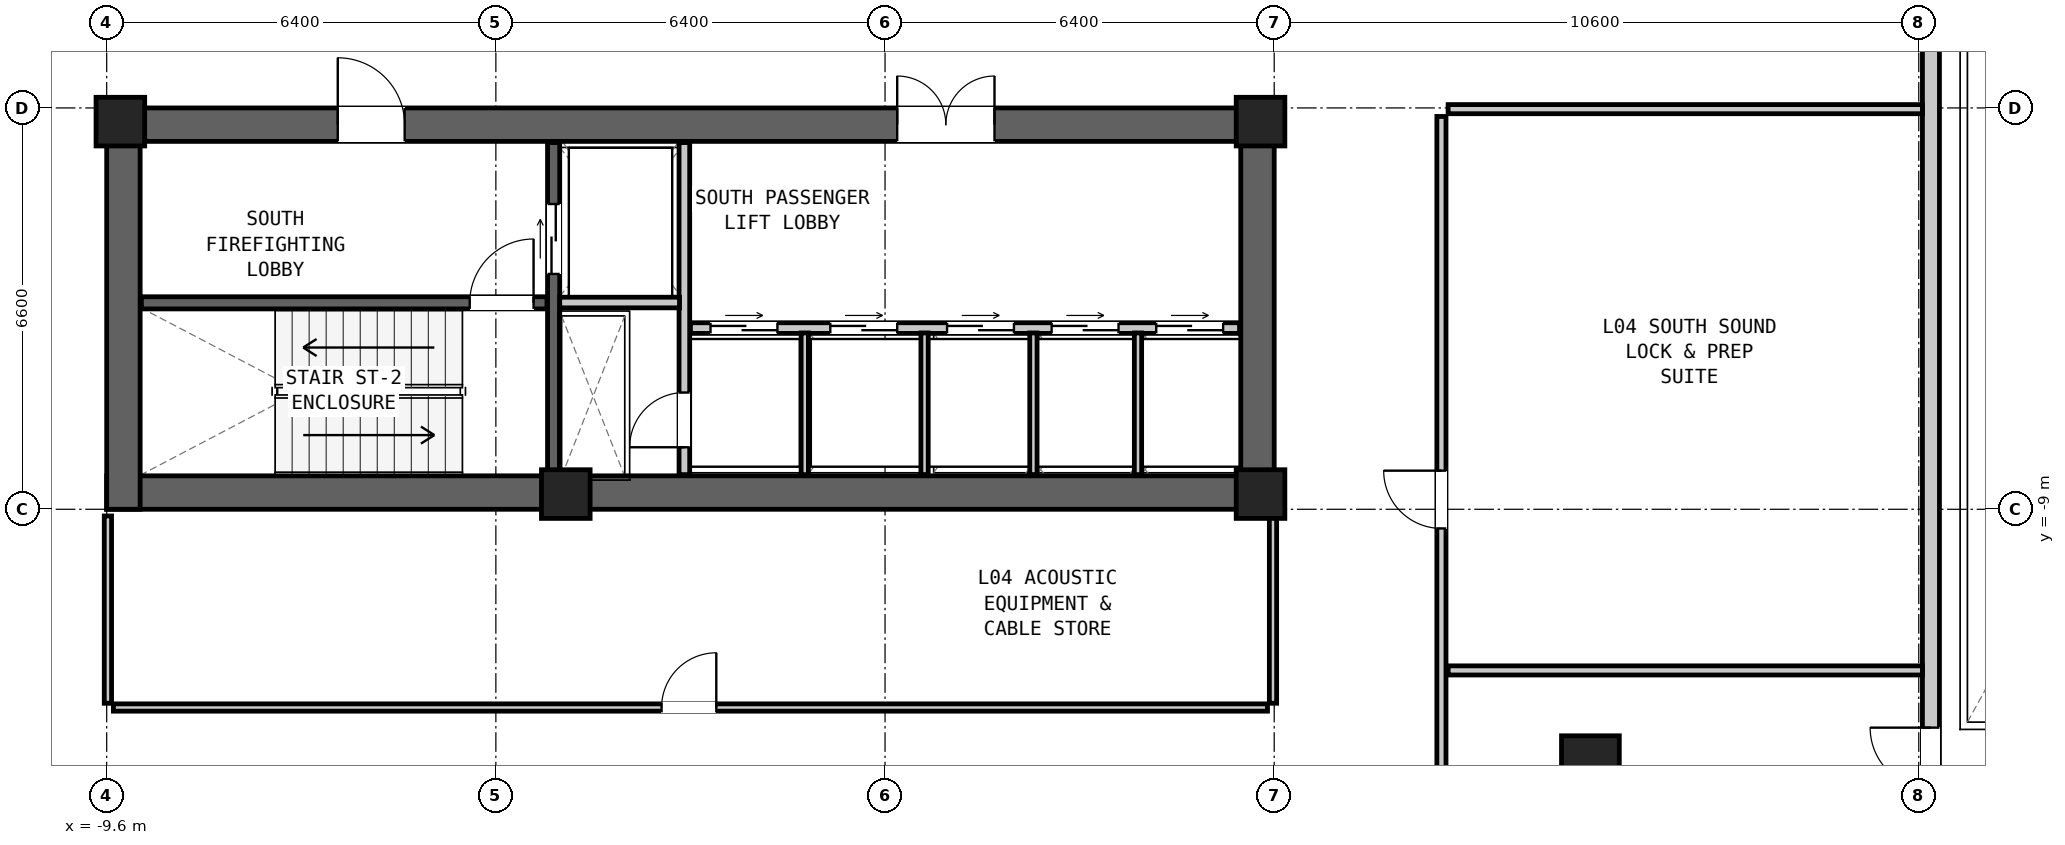
"""IFC4 building model, lengths in metres.
Left out: names, types, materials, properties, quantities, classifications, styles, units other than length and angle.
Written with IfcOpenShell. Run it as: python <this file> out.ifc"""

import sys

from ifc_helpers import new_model, si_unit, direction, frame, frame_2d, origin, origin_2d, place, context, subcontext, project, spatial, rectangle, hollow_rectangle, extrude, element, fill, save


model = new_model("IFC4")
c1 = context("Model", 3, precision=1e-05, world=origin(), true_north=direction((0.0, 1.0)))
c2 = subcontext(c1, "Body", "Model", "MODEL_VIEW")
j1 = project(units=[si_unit("LENGTHUNIT", "METRE"), si_unit("PLANEANGLEUNIT", "RADIAN")], contexts=[c1])
p1 = place(None, origin())
s1 = spatial("IfcSite", under=j1, at=p1, CompositionType="ELEMENT")
p2 = place(p1, origin())
s2 = spatial("IfcBuilding", under=s1, at=p2, CompositionType="ELEMENT")
p3 = place(p2, frame((0.0, 0.0, 17.7)))
s3 = spatial("IfcBuildingStorey", under=s2, at=p3, CompositionType="ELEMENT", Elevation=17.7)
p4 = place(p3, frame((-9.6, -8.725, 0.0), z_axis=(0.0, 0.0, 1.0), x_axis=(1.0, 0.0, 0.0)))
e1 = element("IfcWall", 1, at=p4, inside=s3, PredefinedType="SHEAR", context=c2, shape_type="SweptSolid", body=[
    extrude(rectangle(XDim=19.2, YDim=0.55, at=frame_2d((9.6, 0.0))), origin(), (0.0, 0.0, 1.0), 4.2),
])
p5 = place(p3, frame((-9.6, -2.675, 0.0), z_axis=(0.0, 0.0, 1.0), x_axis=(1.0, 0.0, 0.0)))
e2 = element("IfcWall", 2, at=p5, inside=s3, PredefinedType="SHEAR", context=c2, shape_type="SweptSolid", body=[
    extrude(rectangle(XDim=19.2, YDim=0.55, at=frame_2d((9.6, 0.0))), origin(), (0.0, 0.0, 1.0), 4.2),
])
p6 = place(p5, frame((3.8, 0.0, 0.0)))
e3 = element("IfcOpeningElement", 3, at=p6, cuts=e2, PredefinedType="OPENING", context=c2, shape_type="SweptSolid", body=[
    extrude(rectangle(XDim=1.1, YDim=2.08, at=frame_2d((0.55, 1.04))), frame((0.0, 0.287, 0.0), z_axis=(0.0, -1.0, 0.0), x_axis=(1.0, 0.0, 0.0)), (0.0, 0.0, 1.0), 0.574),
])
p7 = place(p5, frame((13.0, 0.0, 0.0)))
e4 = element("IfcOpeningElement", 4, at=p7, cuts=e2, PredefinedType="OPENING", context=c2, shape_type="SweptSolid", body=[
    extrude(rectangle(XDim=1.6, YDim=2.12, at=frame_2d((0.8, 1.06))), frame((0.0, 0.287, 0.0), z_axis=(0.0, -1.0, 0.0), x_axis=(1.0, 0.0, 0.0)), (0.0, 0.0, 1.0), 0.574),
])
for number, where, z_axis, x_axis in (
    (5, (-9.325, -9.0, 0.0), (0.0, 0.0, 1.0), (0.0, 1.0, 0.0)),
    (6, (9.325, -9.0, 0.0), (0.0, 0.0, 1.0), (0.0, 1.0, 0.0)),
):
    element("IfcWall", number, at=place(p3, frame(where, z_axis=z_axis, x_axis=x_axis)), inside=s3, PredefinedType="SHEAR", context=c2, shape_type="SweptSolid", body=[
        extrude(rectangle(XDim=6.6, YDim=0.55, at=frame_2d((3.3, 0.0))), origin(), (0.0, 0.0, 1.0), 4.2),
    ])
p8 = place(p3, frame((14.8, -13.2, 0.0), z_axis=(0.0, 0.0, 1.0), x_axis=(1.0, 0.0, 0.0)))
e7 = element("IfcColumn", 7, at=p8, inside=s3, PredefinedType="COLUMN", context=c2, shape_type="SweptSolid", body=[
    extrude(hollow_rectangle(XDim=0.95, YDim=0.95, WallThickness=0.06, at=origin_2d()), origin(), (0.0, 0.0, 1.0), 4.2),
])
for number, where, z_axis, x_axis in (
    (8, (-9.375, -2.625, 0.0), (0.0, 0.0, 1.0), (1.0, 0.0, 0.0)),
    (9, (9.375, -2.625, 0.0), (0.0, 0.0, 1.0), (1.0, 0.0, 0.0)),
    (10, (-2.05, -8.75, 0.0), (0.0, 0.0, 1.0), (1.0, 0.0, 0.0)),
    (11, (9.375, -8.75, 0.0), (0.0, 0.0, 1.0), (1.0, 0.0, 0.0)),
):
    element("IfcColumn", number, at=place(p3, frame(where, z_axis=z_axis, x_axis=x_axis)), inside=s3, PredefinedType="COLUMN", context=c2, shape_type="SweptSolid", body=[
        extrude(rectangle(XDim=0.8, YDim=0.8, at=origin_2d()), origin(), (0.0, 0.0, 1.0), 4.2),
    ])
p9 = place(p3, frame((-9.03, -5.605, 0.0), z_axis=(0.0, 0.0, 1.0), x_axis=(1.0, 0.0, 0.0)))
e12 = element("IfcWall", 12, at=p9, inside=s3, PredefinedType="SHEAR", context=c2, shape_type="SweptSolid", body=[
    extrude(rectangle(XDim=6.67, YDim=0.2, at=frame_2d((3.335, 0.0))), origin(), (0.0, 0.0, 1.0), 3.82),
])
p10 = place(p9, frame((5.4, 0.0, 0.0)))
e13 = element("IfcOpeningElement", 13, at=p10, cuts=e12, PredefinedType="OPENING", context=c2, shape_type="SweptSolid", body=[
    extrude(rectangle(XDim=1.05, YDim=2.08, at=frame_2d((0.525, 1.04))), frame((0.0, 0.112, 0.0), z_axis=(0.0, -1.0, 0.0), x_axis=(1.0, 0.0, 0.0)), (0.0, 0.0, 1.0), 0.224),
])
p11 = place(p3, frame((-2.25, -8.43, 0.0), z_axis=(0.0, 0.0, 1.0), x_axis=(0.0, 1.0, 0.0)))
e14 = element("IfcWall", 14, at=p11, inside=s3, PredefinedType="SHEAR", context=c2, shape_type="SweptSolid", body=[
    extrude(rectangle(XDim=5.46, YDim=0.2, at=frame_2d((2.73, 0.0))), origin(), (0.0, 0.0, 1.0), 3.82),
])
p12 = place(p11, frame((3.3, 0.0, 0.0)))
e15 = element("IfcOpeningElement", 15, at=p12, cuts=e14, PredefinedType="OPENING", context=c2, shape_type="SweptSolid", body=[
    extrude(rectangle(XDim=1.15, YDim=2.08, at=frame_2d((0.575, 1.04))), frame((0.0, 0.112, 0.0), z_axis=(0.0, -1.0, 0.0), x_axis=(1.0, 0.0, 0.0)), (0.0, 0.0, 1.0), 0.224),
])
p13 = place(p3, frame((-0.1, -8.43, 0.0), z_axis=(0.0, 0.0, 1.0), x_axis=(0.0, 1.0, 0.0)))
e16 = element("IfcWall", 16, at=p13, inside=s3, PredefinedType="PARTITIONING", context=c2, shape_type="SweptSolid", body=[
    extrude(rectangle(XDim=5.46, YDim=0.175, at=frame_2d((2.73, 0.0))), origin(), (0.0, 0.0, 1.0), 3.82),
])
p14 = place(p13, frame((0.45, 0.0, 0.0)))
e17 = element("IfcOpeningElement", 17, at=p14, cuts=e16, PredefinedType="OPENING", context=c2, shape_type="SweptSolid", body=[
    extrude(rectangle(XDim=0.9, YDim=2.05, at=frame_2d((0.45, 1.025))), frame((0.0, 0.1, 0.0), z_axis=(0.0, -1.0, 0.0), x_axis=(1.0, 0.0, 0.0)), (0.0, 0.0, 1.0), 0.199),
])
p15 = place(p3, frame((-2.15, -5.6, 0.0), z_axis=(0.0, 0.0, 1.0), x_axis=(1.0, 0.0, 0.0)))
e18 = element("IfcWall", 18, at=p15, inside=s3, PredefinedType="PARTITIONING", context=c2, shape_type="SweptSolid", body=[
    extrude(rectangle(XDim=1.97, YDim=0.175, at=frame_2d((0.985, 0.0))), origin(), (0.0, 0.0, 1.0), 3.82),
])
p16 = place(p3, frame((0.0, -6.02, 0.0), z_axis=(0.0, 0.0, 1.0), x_axis=(1.0, 0.0, 0.0)))
e19 = element("IfcWall", 19, at=p16, inside=s3, PredefinedType="PARTITIONING", context=c2, shape_type="SweptSolid", body=[
    extrude(rectangle(XDim=9.03, YDim=0.175, at=frame_2d((4.515, 0.0))), origin(), (0.0, 0.0, 1.0), 3.82),
])
p17 = place(p16, frame((0.33, 0.0, 0.0)))
e20 = element("IfcOpeningElement", 20, at=p17, cuts=e19, PredefinedType="OPENING", context=c2, shape_type="SweptSolid", body=[
    extrude(rectangle(XDim=1.1, YDim=2.06, at=frame_2d((0.55, 1.03))), frame((0.0, 0.1, 0.0), z_axis=(0.0, -1.0, 0.0), x_axis=(1.0, 0.0, 0.0)), (0.0, 0.0, 1.0), 0.199),
])
p18 = place(p16, frame((2.3, 0.0, 0.0)))
e21 = element("IfcOpeningElement", 21, at=p18, cuts=e19, PredefinedType="OPENING", context=c2, shape_type="SweptSolid", body=[
    extrude(rectangle(XDim=1.1, YDim=2.06, at=frame_2d((0.55, 1.03))), frame((0.0, 0.1, 0.0), z_axis=(0.0, -1.0, 0.0), x_axis=(1.0, 0.0, 0.0)), (0.0, 0.0, 1.0), 0.199),
])
p19 = place(p16, frame((4.22, 0.0, 0.0)))
e22 = element("IfcOpeningElement", 22, at=p19, cuts=e19, PredefinedType="OPENING", context=c2, shape_type="SweptSolid", body=[
    extrude(rectangle(XDim=1.1, YDim=2.06, at=frame_2d((0.55, 1.03))), frame((0.0, 0.1, 0.0), z_axis=(0.0, -1.0, 0.0), x_axis=(1.0, 0.0, 0.0)), (0.0, 0.0, 1.0), 0.199),
])
p20 = place(p16, frame((5.94, 0.0, 0.0)))
e23 = element("IfcOpeningElement", 23, at=p20, cuts=e19, PredefinedType="OPENING", context=c2, shape_type="SweptSolid", body=[
    extrude(rectangle(XDim=1.1, YDim=2.06, at=frame_2d((0.55, 1.03))), frame((0.0, 0.1, 0.0), z_axis=(0.0, -1.0, 0.0), x_axis=(1.0, 0.0, 0.0)), (0.0, 0.0, 1.0), 0.199),
])
p21 = place(p16, frame((7.66, 0.0, 0.0)))
e24 = element("IfcOpeningElement", 24, at=p21, cuts=e19, PredefinedType="OPENING", context=c2, shape_type="SweptSolid", body=[
    extrude(rectangle(XDim=1.1, YDim=2.06, at=frame_2d((0.55, 1.03))), frame((0.0, 0.1, 0.0), z_axis=(0.0, -1.0, 0.0), x_axis=(1.0, 0.0, 0.0)), (0.0, 0.0, 1.0), 0.199),
])
for number, where, z_axis, x_axis in (
    (25, (1.88, -8.43, 0.0), (0.0, 0.0, 1.0), (0.0, 1.0, 0.0)),
    (26, (3.85, -8.43, 0.0), (0.0, 0.0, 1.0), (0.0, 1.0, 0.0)),
    (27, (5.64, -8.43, 0.0), (0.0, 0.0, 1.0), (0.0, 1.0, 0.0)),
    (28, (7.36, -8.43, 0.0), (0.0, 0.0, 1.0), (0.0, 1.0, 0.0)),
):
    element("IfcWall", number, at=place(p3, frame(where, z_axis=z_axis, x_axis=x_axis)), inside=s3, PredefinedType="PARTITIONING", context=c2, shape_type="SweptSolid", body=[
        extrude(rectangle(XDim=2.33, YDim=0.12, at=frame_2d((1.165, 0.0))), origin(), (0.0, 0.0, 1.0), 3.82),
    ])
p22 = place(p3, frame((20.4, -25.74, 0.0), z_axis=(0.0, 0.0, 1.0), x_axis=(0.0, 1.0, 0.0)))
e29 = element("IfcWall", 29, at=p22, inside=s3, PredefinedType="MOVABLE", context=c2, shape_type="SweptSolid", body=[
    extrude(rectangle(XDim=51.48, YDim=0.28, at=frame_2d((25.74, 0.0))), origin(), (0.0, 0.0, 1.0), 3.193),
])
p23 = place(p22, frame((11.149, 0.0, 0.0)))
e30 = element("IfcOpeningElement", 30, at=p23, cuts=e29, PredefinedType="OPENING", context=c2, shape_type="SweptSolid", body=[
    extrude(rectangle(XDim=2.0, YDim=2.14, at=frame_2d((1.0, 1.07))), frame((0.0, 0.152, 0.0), z_axis=(0.0, -1.0, 0.0), x_axis=(1.0, 0.0, 0.0)), (0.0, 0.0, 1.0), 0.304),
])
p24 = place(p22, frame((38.64, 0.0, 0.0)))
e31 = element("IfcOpeningElement", 31, at=p24, cuts=e29, PredefinedType="OPENING", context=c2, shape_type="SweptSolid", body=[
    extrude(rectangle(XDim=2.0, YDim=2.14, at=frame_2d((1.0, 1.07))), frame((0.0, 0.152, 0.0), z_axis=(0.0, -1.0, 0.0), x_axis=(1.0, 0.0, 0.0)), (0.0, 0.0, 1.0), 0.304),
])
p25 = place(p3, frame((12.35, -15.14, 0.0), z_axis=(0.0, 0.0, 1.0), x_axis=(0.0, 1.0, 0.0)))
e32 = element("IfcWall", 32, at=p25, inside=s3, PredefinedType="PARTITIONING", context=c2, shape_type="SweptSolid", body=[
    extrude(rectangle(XDim=12.6, YDim=0.15, at=frame_2d((6.3, 0.0))), origin(), (0.0, 0.0, 1.0), 3.82),
])
p26 = place(p25, frame((5.825, 0.0, 0.0)))
e33 = element("IfcOpeningElement", 33, at=p26, cuts=e32, PredefinedType="OPENING", context=c2, shape_type="SweptSolid", body=[
    extrude(rectangle(XDim=0.95, YDim=2.1, at=frame_2d((0.475, 1.05))), frame((0.0, 0.087, 0.0), z_axis=(0.0, -1.0, 0.0), x_axis=(1.0, 0.0, 0.0)), (0.0, 0.0, 1.0), 0.174),
])
p27 = place(p3, frame((12.46, -2.42, 0.0), z_axis=(0.0, 0.0, 1.0), x_axis=(1.0, 0.0, 0.0)))
e34 = element("IfcWall", 34, at=p27, inside=s3, PredefinedType="PARTITIONING", context=c2, shape_type="SweptSolid", body=[
    extrude(rectangle(XDim=7.8, YDim=0.15, at=frame_2d((3.9, 0.0))), origin(), (0.0, 0.0, 1.0), 2.682),
])
p28 = place(p3, frame((-9.49, -12.26, 0.0), z_axis=(0.0, 0.0, 1.0), x_axis=(1.0, 0.0, 0.0)))
e35 = element("IfcWall", 35, at=p28, inside=s3, PredefinedType="PARTITIONING", context=c2, shape_type="SweptSolid", body=[
    extrude(rectangle(XDim=18.98, YDim=0.12, at=frame_2d((9.49, 0.0))), origin(), (0.0, 0.0, 1.0), 3.82),
])
p29 = place(p28, frame((9.015, 0.0, 0.0)))
e36 = element("IfcOpeningElement", 36, at=p29, cuts=e35, PredefinedType="OPENING", context=c2, shape_type="SweptSolid", body=[
    extrude(rectangle(XDim=0.9, YDim=2.05, at=frame_2d((0.45, 1.025))), frame((0.0, 0.072, 0.0), z_axis=(0.0, -1.0, 0.0), x_axis=(1.0, 0.0, 0.0)), (0.0, 0.0, 1.0), 0.144),
])
for number, where, z_axis, x_axis in (
    (37, (-9.58, -12.19, 0.0), (0.0, 0.0, 1.0), (0.0, 1.0, 0.0)),
    (38, (9.58, -12.19, 0.0), (0.0, 0.0, 1.0), (0.0, 1.0, 0.0)),
):
    element("IfcWall", number, at=place(p3, frame(where, z_axis=z_axis, x_axis=x_axis)), inside=s3, PredefinedType="PARTITIONING", context=c2, shape_type="SweptSolid", body=[
        extrude(rectangle(XDim=3.08, YDim=0.12, at=frame_2d((1.54, 0.0))), origin(), (0.0, 0.0, 1.0), 3.82),
    ])
p30 = place(p3, frame((12.46, -11.65, 0.0), z_axis=(0.0, 0.0, 1.0), x_axis=(1.0, 0.0, 0.0)))
e39 = element("IfcWall", 39, at=p30, inside=s3, PredefinedType="PARTITIONING", context=c2, shape_type="SweptSolid", body=[
    extrude(rectangle(XDim=7.8, YDim=0.15, at=frame_2d((3.9, 0.0))), origin(), (0.0, 0.0, 1.0), 3.82),
])
p31 = place(p10, origin())
e40 = element("IfcDoor", 40, at=p31, inside=s3, OperationType="SINGLE_SWING_RIGHT", PredefinedType="DOOR", context=c2, shape_type="SweptSolid", body=[
    extrude(rectangle(XDim=1.05, YDim=2.08, at=frame_2d((0.525, 1.04))), frame((0.0, 0.025, 0.0), z_axis=(0.0, -1.0, 0.0), x_axis=(1.0, 0.0, 0.0)), (0.0, 0.0, 1.0), 0.05),
])
fill(e13, e40)
p32 = place(p6, origin())
e41 = element("IfcDoor", 41, at=p32, inside=s3, OperationType="SINGLE_SWING_LEFT", PredefinedType="DOOR", context=c2, shape_type="SweptSolid", body=[
    extrude(rectangle(XDim=1.1, YDim=2.08, at=frame_2d((0.55, 1.04))), frame((0.0, 0.025, 0.0), z_axis=(0.0, -1.0, 0.0), x_axis=(1.0, 0.0, 0.0)), (0.0, 0.0, 1.0), 0.05),
])
fill(e3, e41)
p33 = place(p12, origin())
e42 = element("IfcDoor", 42, at=p33, inside=s3, OperationType="DOUBLE_DOOR_SLIDING", PredefinedType="DOOR", context=c2, shape_type="SweptSolid", body=[
    extrude(rectangle(XDim=1.15, YDim=2.08, at=frame_2d((0.575, 1.04))), frame((0.0, 0.025, 0.0), z_axis=(0.0, -1.0, 0.0), x_axis=(1.0, 0.0, 0.0)), (0.0, 0.0, 1.0), 0.05),
])
fill(e15, e42)
p34 = place(p14, origin())
e43 = element("IfcDoor", 43, at=p34, inside=s3, OperationType="SINGLE_SWING_LEFT", PredefinedType="DOOR", context=c2, shape_type="SweptSolid", body=[
    extrude(rectangle(XDim=0.9, YDim=2.05, at=frame_2d((0.45, 1.025))), frame((0.0, 0.025, 0.0), z_axis=(0.0, -1.0, 0.0), x_axis=(1.0, 0.0, 0.0)), (0.0, 0.0, 1.0), 0.05),
])
fill(e17, e43)
p35 = place(p7, origin())
e44 = element("IfcDoor", 44, at=p35, inside=s3, OperationType="DOUBLE_DOOR_SINGLE_SWING", PredefinedType="DOOR", context=c2, shape_type="SweptSolid", body=[
    extrude(rectangle(XDim=1.6, YDim=2.12, at=frame_2d((0.8, 1.06))), frame((0.0, 0.025, 0.0), z_axis=(0.0, -1.0, 0.0), x_axis=(1.0, 0.0, 0.0)), (0.0, 0.0, 1.0), 0.05),
])
fill(e4, e44)
p36 = place(p23, origin())
e45 = element("IfcDoor", 45, at=p36, inside=s3, OperationType="DOUBLE_DOOR_SINGLE_SWING", PredefinedType="DOOR", context=c2, shape_type="SweptSolid", body=[
    extrude(rectangle(XDim=2.0, YDim=2.14, at=frame_2d((1.0, 1.07))), frame((0.0, 0.025, 0.0), z_axis=(0.0, -1.0, 0.0), x_axis=(1.0, 0.0, 0.0)), (0.0, 0.0, 1.0), 0.05),
])
fill(e30, e45)
p37 = place(p26, origin())
e46 = element("IfcDoor", 46, at=p37, inside=s3, OperationType="SINGLE_SWING_RIGHT", PredefinedType="DOOR", context=c2, shape_type="SweptSolid", body=[
    extrude(rectangle(XDim=0.95, YDim=2.1, at=frame_2d((0.475, 1.05))), frame((0.0, 0.025, 0.0), z_axis=(0.0, -1.0, 0.0), x_axis=(1.0, 0.0, 0.0)), (0.0, 0.0, 1.0), 0.05),
])
fill(e33, e46)
p38 = place(p29, origin())
e47 = element("IfcDoor", 47, at=p38, inside=s3, OperationType="SINGLE_SWING_RIGHT", PredefinedType="DOOR", context=c2, shape_type="SweptSolid", body=[
    extrude(rectangle(XDim=0.9, YDim=2.05, at=frame_2d((0.45, 1.025))), frame((0.0, 0.025, 0.0), z_axis=(0.0, -1.0, 0.0), x_axis=(1.0, 0.0, 0.0)), (0.0, 0.0, 1.0), 0.05),
])
fill(e36, e47)
p39 = place(p17, origin())
e48 = element("IfcDoor", 48, at=p39, inside=s3, OperationType="DOUBLE_DOOR_SLIDING", PredefinedType="DOOR", context=c2, shape_type="SweptSolid", body=[
    extrude(rectangle(XDim=1.1, YDim=2.06, at=frame_2d((0.55, 1.03))), frame((0.0, 0.025, 0.0), z_axis=(0.0, -1.0, 0.0), x_axis=(1.0, 0.0, 0.0)), (0.0, 0.0, 1.0), 0.05),
])
fill(e20, e48)
p40 = place(p18, origin())
e49 = element("IfcDoor", 49, at=p40, inside=s3, OperationType="DOUBLE_DOOR_SLIDING", PredefinedType="DOOR", context=c2, shape_type="SweptSolid", body=[
    extrude(rectangle(XDim=1.1, YDim=2.06, at=frame_2d((0.55, 1.03))), frame((0.0, 0.025, 0.0), z_axis=(0.0, -1.0, 0.0), x_axis=(1.0, 0.0, 0.0)), (0.0, 0.0, 1.0), 0.05),
])
fill(e21, e49)
p41 = place(p19, origin())
e50 = element("IfcDoor", 50, at=p41, inside=s3, OperationType="DOUBLE_DOOR_SLIDING", PredefinedType="DOOR", context=c2, shape_type="SweptSolid", body=[
    extrude(rectangle(XDim=1.1, YDim=2.06, at=frame_2d((0.55, 1.03))), frame((0.0, 0.025, 0.0), z_axis=(0.0, -1.0, 0.0), x_axis=(1.0, 0.0, 0.0)), (0.0, 0.0, 1.0), 0.05),
])
fill(e22, e50)
p42 = place(p20, origin())
e51 = element("IfcDoor", 51, at=p42, inside=s3, OperationType="DOUBLE_DOOR_SLIDING", PredefinedType="DOOR", context=c2, shape_type="SweptSolid", body=[
    extrude(rectangle(XDim=1.1, YDim=2.06, at=frame_2d((0.55, 1.03))), frame((0.0, 0.025, 0.0), z_axis=(0.0, -1.0, 0.0), x_axis=(1.0, 0.0, 0.0)), (0.0, 0.0, 1.0), 0.05),
])
fill(e23, e51)
p43 = place(p21, origin())
e52 = element("IfcDoor", 52, at=p43, inside=s3, OperationType="DOUBLE_DOOR_SLIDING", PredefinedType="DOOR", context=c2, shape_type="SweptSolid", body=[
    extrude(rectangle(XDim=1.1, YDim=2.06, at=frame_2d((0.55, 1.03))), frame((0.0, 0.025, 0.0), z_axis=(0.0, -1.0, 0.0), x_axis=(1.0, 0.0, 0.0)), (0.0, 0.0, 1.0), 0.05),
])
fill(e24, e52)
save(model, sys.argv[1])
